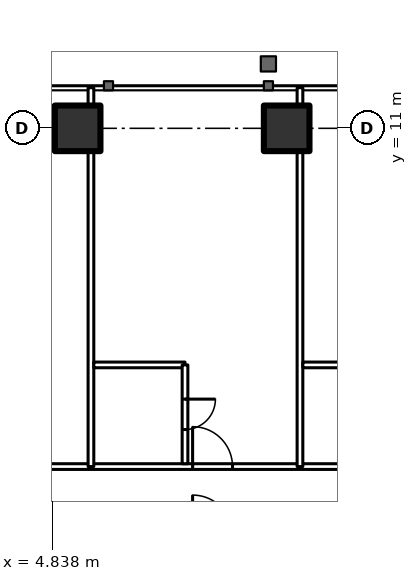
"""IFC4 building model, lengths in metres.
Left out: names, types, materials, properties, quantities, classifications, styles, units other than length and angle.
Written with IfcOpenShell. Run it as: python <this file> out.ifc"""

import sys

from ifc_helpers import new_model, si_unit, direction, frame, frame_2d, origin, origin_2d, place, context, subcontext, project, spatial, rectangle, hollow_rectangle, extrude, element, fill, save


model = new_model("IFC4")
c1 = context("Model", 3, precision=1e-05, world=origin(), true_north=direction((0.0, 1.0)))
c2 = subcontext(c1, "Body", "Model", "MODEL_VIEW")
j1 = project(units=[si_unit("LENGTHUNIT", "METRE"), si_unit("PLANEANGLEUNIT", "RADIAN")], contexts=[c1])
p1 = place(None, origin())
s1 = spatial("IfcSite", under=j1, at=p1, CompositionType="ELEMENT")
p2 = place(p1, origin())
s2 = spatial("IfcBuilding", under=s1, at=p2, CompositionType="ELEMENT")
p3 = place(p2, frame((0.0, 0.0, 215.3)))
s3 = spatial("IfcBuildingStorey", under=s2, at=p3, CompositionType="ELEMENT", Elevation=215.3)
for number, where, z_axis, x_axis in (
    (1, (5.5, 11.0, 0.0), (0.0, 0.0, 1.0), (1.0, 0.0, 0.0)),
    (2, (11.0, 11.0, 0.0), (0.0, 0.0, 1.0), (1.0, 0.0, 0.0)),
):
    element("IfcColumn", number, at=place(p3, frame(where, z_axis=z_axis, x_axis=x_axis)), inside=s3, PredefinedType="COLUMN", context=c2, shape_type="SweptSolid", body=[
        extrude(hollow_rectangle(XDim=1.2, YDim=1.2, WallThickness=0.12, at=origin_2d()), origin(), (0.0, 0.0, 1.0), 3.6),
    ])
p4 = place(p3, frame((-27.5, 2.1, 0.0), z_axis=(0.0, 0.0, 1.0), x_axis=(1.0, 0.0, 0.0)))
e3 = element("IfcWall", 3, at=p4, inside=s3, PredefinedType="PARTITIONING", context=c2, shape_type="SweptSolid", body=[
    extrude(rectangle(XDim=55.0, YDim=0.15, at=frame_2d((27.5, 0.0))), origin(), (0.0, 0.0, 1.0), 3.4),
])
p5 = place(p4, frame((2.025, 0.0, 0.0)))
e4 = element("IfcOpeningElement", 4, at=p5, cuts=e3, PredefinedType="OPENING", context=c2, shape_type="SweptSolid", body=[
    extrude(rectangle(XDim=1.05, YDim=2.4, at=frame_2d((0.525, 1.2))), frame((0.0, 0.085, 0.0), z_axis=(0.0, -1.0, 0.0), x_axis=(1.0, 0.0, 0.0)), (0.0, 0.0, 1.0), 0.17),
])
p6 = place(p4, frame((8.525, 0.0, 0.0)))
e5 = element("IfcOpeningElement", 5, at=p6, cuts=e3, PredefinedType="OPENING", context=c2, shape_type="SweptSolid", body=[
    extrude(rectangle(XDim=1.05, YDim=2.4, at=frame_2d((0.525, 1.2))), frame((0.0, 0.085, 0.0), z_axis=(0.0, -1.0, 0.0), x_axis=(1.0, 0.0, 0.0)), (0.0, 0.0, 1.0), 0.17),
])
p7 = place(p4, frame((14.025, 0.0, 0.0)))
e6 = element("IfcOpeningElement", 6, at=p7, cuts=e3, PredefinedType="OPENING", context=c2, shape_type="SweptSolid", body=[
    extrude(rectangle(XDim=1.05, YDim=2.4, at=frame_2d((0.525, 1.2))), frame((0.0, 0.085, 0.0), z_axis=(0.0, -1.0, 0.0), x_axis=(1.0, 0.0, 0.0)), (0.0, 0.0, 1.0), 0.17),
])
p8 = place(p4, frame((19.525, 0.0, 0.0)))
e7 = element("IfcOpeningElement", 7, at=p8, cuts=e3, PredefinedType="OPENING", context=c2, shape_type="SweptSolid", body=[
    extrude(rectangle(XDim=1.05, YDim=2.4, at=frame_2d((0.525, 1.2))), frame((0.0, 0.085, 0.0), z_axis=(0.0, -1.0, 0.0), x_axis=(1.0, 0.0, 0.0)), (0.0, 0.0, 1.0), 0.17),
])
p9 = place(p4, frame((25.025, 0.0, 0.0)))
e8 = element("IfcOpeningElement", 8, at=p9, cuts=e3, PredefinedType="OPENING", context=c2, shape_type="SweptSolid", body=[
    extrude(rectangle(XDim=1.05, YDim=2.4, at=frame_2d((0.525, 1.2))), frame((0.0, 0.085, 0.0), z_axis=(0.0, -1.0, 0.0), x_axis=(1.0, 0.0, 0.0)), (0.0, 0.0, 1.0), 0.17),
])
p10 = place(p4, frame((30.525, 0.0, 0.0)))
e9 = element("IfcOpeningElement", 9, at=p10, cuts=e3, PredefinedType="OPENING", context=c2, shape_type="SweptSolid", body=[
    extrude(rectangle(XDim=1.05, YDim=2.4, at=frame_2d((0.525, 1.2))), frame((0.0, 0.085, 0.0), z_axis=(0.0, -1.0, 0.0), x_axis=(1.0, 0.0, 0.0)), (0.0, 0.0, 1.0), 0.17),
])
p11 = place(p4, frame((36.025, 0.0, 0.0)))
e10 = element("IfcOpeningElement", 10, at=p11, cuts=e3, PredefinedType="OPENING", context=c2, shape_type="SweptSolid", body=[
    extrude(rectangle(XDim=1.05, YDim=2.4, at=frame_2d((0.525, 1.2))), frame((0.0, 0.085, 0.0), z_axis=(0.0, -1.0, 0.0), x_axis=(1.0, 0.0, 0.0)), (0.0, 0.0, 1.0), 0.17),
])
p12 = place(p4, frame((41.525, 0.0, 0.0)))
e11 = element("IfcOpeningElement", 11, at=p12, cuts=e3, PredefinedType="OPENING", context=c2, shape_type="SweptSolid", body=[
    extrude(rectangle(XDim=1.05, YDim=2.4, at=frame_2d((0.525, 1.2))), frame((0.0, 0.085, 0.0), z_axis=(0.0, -1.0, 0.0), x_axis=(1.0, 0.0, 0.0)), (0.0, 0.0, 1.0), 0.17),
])
p13 = place(p4, frame((47.025, 0.0, 0.0)))
e12 = element("IfcOpeningElement", 12, at=p13, cuts=e3, PredefinedType="OPENING", context=c2, shape_type="SweptSolid", body=[
    extrude(rectangle(XDim=1.05, YDim=2.4, at=frame_2d((0.525, 1.2))), frame((0.0, 0.085, 0.0), z_axis=(0.0, -1.0, 0.0), x_axis=(1.0, 0.0, 0.0)), (0.0, 0.0, 1.0), 0.17),
])
p14 = place(p4, frame((52.525, 0.0, 0.0)))
e13 = element("IfcOpeningElement", 13, at=p14, cuts=e3, PredefinedType="OPENING", context=c2, shape_type="SweptSolid", body=[
    extrude(rectangle(XDim=1.05, YDim=2.4, at=frame_2d((0.525, 1.2))), frame((0.0, 0.085, 0.0), z_axis=(0.0, -1.0, 0.0), x_axis=(1.0, 0.0, 0.0)), (0.0, 0.0, 1.0), 0.17),
])
for number, where, z_axis, x_axis in (
    (14, (5.85, 2.1, 0.0), (0.0, 0.0, 1.0), (0.0, 1.0, 0.0)),
    (15, (11.35, 2.1, 0.0), (0.0, 0.0, 1.0), (0.0, 1.0, 0.0)),
):
    element("IfcWall", number, at=place(p3, frame(where, z_axis=z_axis, x_axis=x_axis)), inside=s3, PredefinedType="PARTITIONING", context=c2, shape_type="SweptSolid", body=[
        extrude(rectangle(XDim=9.97, YDim=0.15, at=frame_2d((4.985, 0.0))), origin(), (0.0, 0.0, 1.0), 3.4),
    ])
p15 = place(p3, frame((5.925, 4.775, 0.0), z_axis=(0.0, 0.0, 1.0), x_axis=(1.0, 0.0, 0.0)))
e16 = element("IfcWall", 16, at=p15, inside=s3, PredefinedType="PARTITIONING", context=c2, shape_type="SweptSolid", body=[
    extrude(rectangle(XDim=2.4, YDim=0.15, at=frame_2d((1.2, 0.0))), origin(), (0.0, 0.0, 1.0), 3.4),
])
p16 = place(p3, frame((8.325, 2.175, 0.0), z_axis=(0.0, 0.0, 1.0), x_axis=(0.0, 1.0, 0.0)))
e17 = element("IfcWall", 17, at=p16, inside=s3, PredefinedType="PARTITIONING", context=c2, shape_type="SweptSolid", body=[
    extrude(rectangle(XDim=2.6, YDim=0.15, at=frame_2d((1.3, 0.0))), origin(), (0.0, 0.0, 1.0), 3.4),
])
p17 = place(p16, frame((0.9, 0.0, 0.0)))
e18 = element("IfcOpeningElement", 18, at=p17, cuts=e17, PredefinedType="OPENING", context=c2, shape_type="SweptSolid", body=[
    extrude(rectangle(XDim=0.8, YDim=2.2, at=frame_2d((0.4, 1.1))), frame((0.0, 0.085, 0.0), z_axis=(0.0, -1.0, 0.0), x_axis=(1.0, 0.0, 0.0)), (0.0, 0.0, 1.0), 0.17),
])
p18 = place(p3, frame((11.425, 4.775, 0.0), z_axis=(0.0, 0.0, 1.0), x_axis=(1.0, 0.0, 0.0)))
e19 = element("IfcWall", 19, at=p18, inside=s3, PredefinedType="PARTITIONING", context=c2, shape_type="SweptSolid", body=[
    extrude(rectangle(XDim=2.4, YDim=0.15, at=frame_2d((1.2, 0.0))), origin(), (0.0, 0.0, 1.0), 3.4),
])
p19 = place(p17, origin())
e20 = element("IfcDoor", 20, at=p19, inside=s3, OperationType="SINGLE_SWING_RIGHT", PredefinedType="DOOR", context=c2, shape_type="SweptSolid", body=[
    extrude(rectangle(XDim=0.8, YDim=2.2, at=frame_2d((0.4, 1.1))), frame((0.0, 0.025, 0.0), z_axis=(0.0, -1.0, 0.0), x_axis=(1.0, 0.0, 0.0)), (0.0, 0.0, 1.0), 0.05),
])
fill(e18, e20)
p20 = place(p11, origin())
e21 = element("IfcDoor", 21, at=p20, inside=s3, OperationType="SINGLE_SWING_LEFT", PredefinedType="DOOR", context=c2, shape_type="SweptSolid", body=[
    extrude(rectangle(XDim=1.05, YDim=2.4, at=frame_2d((0.525, 1.2))), frame((0.0, 0.025, 0.0), z_axis=(0.0, -1.0, 0.0), x_axis=(1.0, 0.0, 0.0)), (0.0, 0.0, 1.0), 0.05),
])
fill(e10, e21)
save(model, sys.argv[1])
